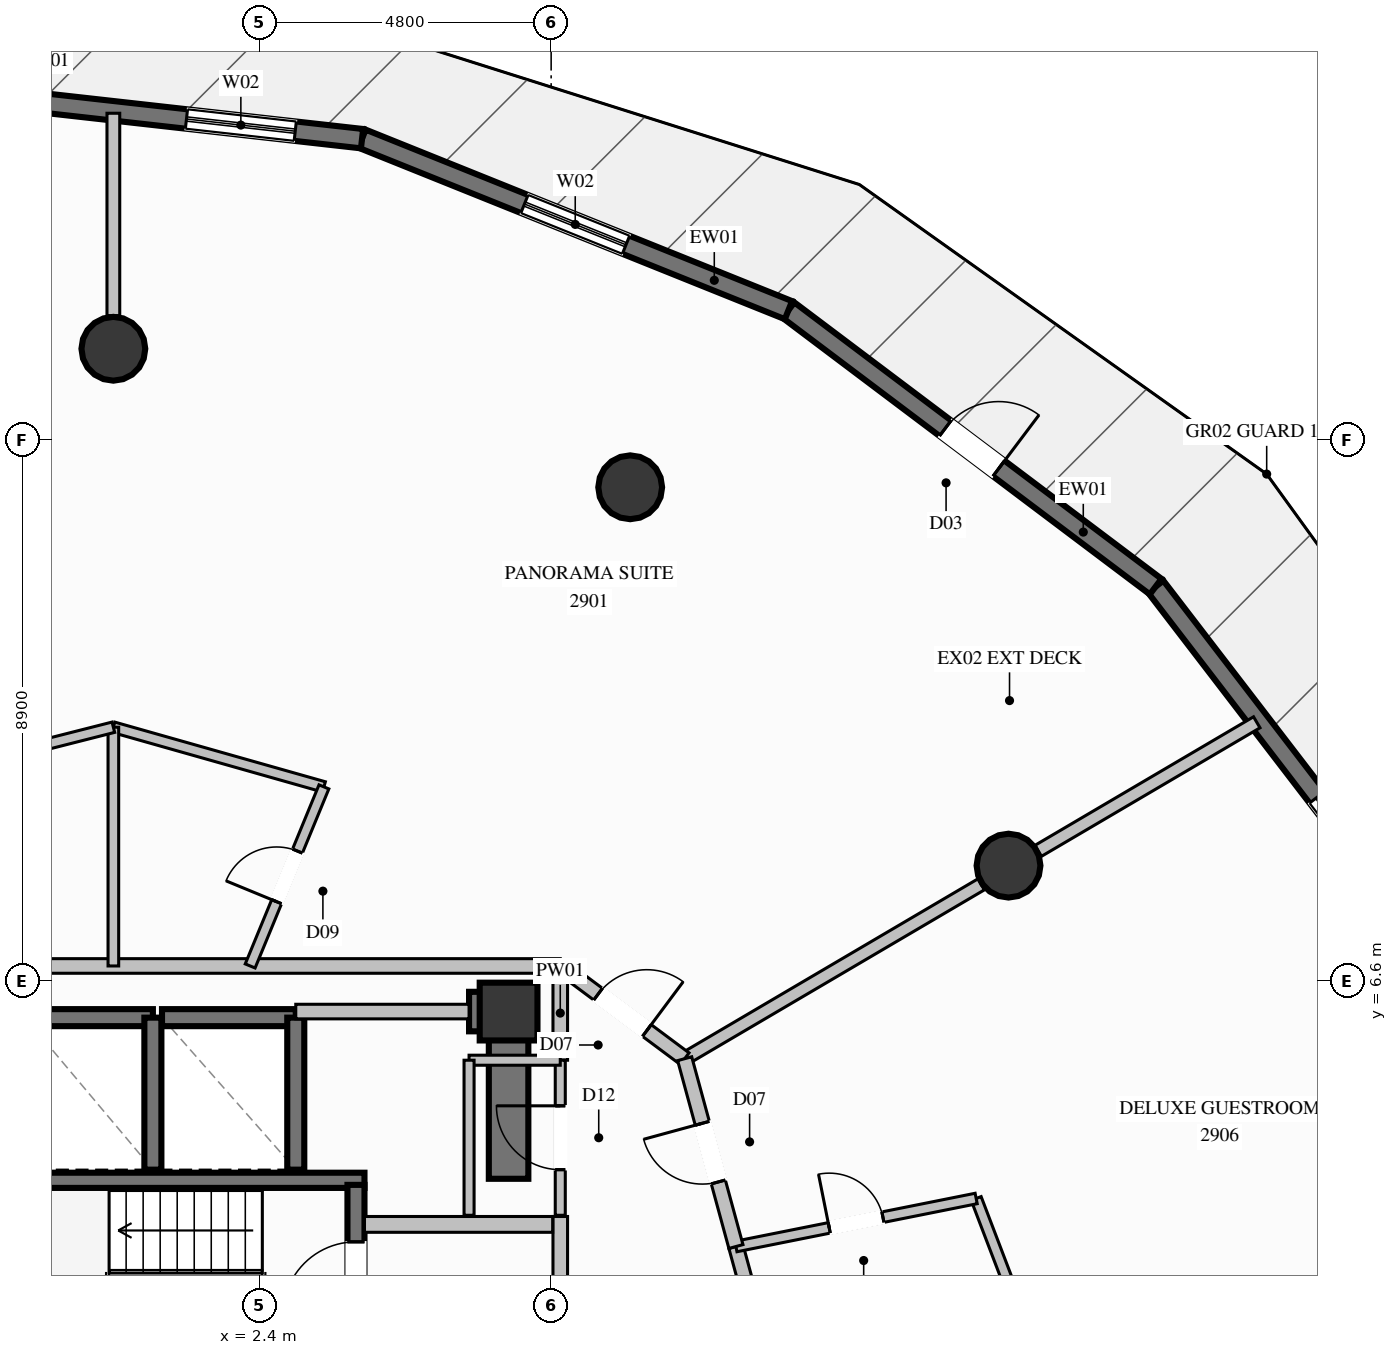
"""IFC4 building model, lengths in metres.
Left out: names, types, materials, properties, quantities, classifications, styles, units other than length and angle.
Written with IfcOpenShell. Run it as: python <this file> out.ifc"""

import sys

from ifc_helpers import new_model, si_unit, direction, frame, frame_2d, origin, origin_2d, place, context, subcontext, project, spatial, rectangle, circle, extrude, element, fill, save


model = new_model("IFC4")
c1 = context("Model", 3, precision=1e-05, world=origin(), true_north=direction((0.0, 1.0)))
c2 = subcontext(c1, "Body", "Model", "MODEL_VIEW")
j1 = project(units=[si_unit("LENGTHUNIT", "METRE"), si_unit("PLANEANGLEUNIT", "RADIAN")], contexts=[c1])
p1 = place(None, origin())
s1 = spatial("IfcSite", under=j1, at=p1, CompositionType="ELEMENT")
p2 = place(p1, origin())
s2 = spatial("IfcBuilding", under=s1, at=p2, CompositionType="ELEMENT")
p3 = place(p2, frame((0.0, 0.0, 109.8)))
s3 = spatial("IfcBuildingStorey", under=s2, at=p3, CompositionType="ELEMENT", Elevation=109.8)
p4 = place(p3, frame((6.5, 6.1, 0.0), z_axis=(0.0, 0.0, 1.0), x_axis=(1.0, 0.0, 0.0)))
e1 = element("IfcColumn", 1, at=p4, inside=s3, PredefinedType="COLUMN", context=c2, shape_type="SweptSolid", body=[
    extrude(rectangle(XDim=0.95, YDim=0.95, at=origin_2d()), origin(), (0.0, 0.0, 1.0), 3.6),
])
p5 = place(p3, frame((-4.13, 3.325, 0.0), z_axis=(0.0, 0.0, 1.0), x_axis=(1.0, 0.0, 0.0)))
e2 = element("IfcWall", 2, at=p5, inside=s3, PredefinedType="SOLIDWALL", context=c2, shape_type="SweptSolid", body=[
    extrude(rectangle(XDim=8.26, YDim=0.25, at=frame_2d((4.13, 0.0))), origin(), (0.0, 0.0, 1.0), 3.6),
])
p6 = place(p3, frame((5.85, 6.1, 0.0), z_axis=(0.0, 0.0, 1.0), x_axis=(1.0, 0.0, 0.0)))
e3 = element("IfcWall", 3, at=p6, inside=s3, PredefinedType="SHEAR", context=c2, shape_type="SweptSolid", body=[
    extrude(rectangle(XDim=0.325, YDim=0.65, at=frame_2d((0.163, 0.0))), origin(), (0.0, 0.0, 1.0), 3.6),
])
p7 = place(p3, frame((6.5, 3.35, 0.0), z_axis=(0.0, 0.0, 1.0), x_axis=(0.0, 1.0, 0.0)))
e4 = element("IfcWall", 4, at=p7, inside=s3, PredefinedType="SHEAR", context=c2, shape_type="SweptSolid", body=[
    extrude(rectangle(XDim=3.075, YDim=0.65, at=frame_2d((1.538, 0.0))), origin(), (0.0, 0.0, 1.0), 3.6),
])
for number, where, z_axis, x_axis in (
    (5, (14.722, 8.5, 0.0), (0.0, 0.0, 1.0), (1.0, 0.0, 0.0)),
    (6, (8.5, 14.722, 0.0), (0.0, 0.0, 1.0), (1.0, 0.0, 0.0)),
    (7, (0.0, 17.0, 0.0), (0.0, 0.0, 1.0), (1.0, 0.0, 0.0)),
):
    element("IfcColumn", number, at=place(p3, frame(where, z_axis=z_axis, x_axis=x_axis)), inside=s3, PredefinedType="COLUMN", context=c2, shape_type="SweptSolid", body=[
        extrude(circle(Radius=0.525, at=origin_2d()), origin(), (0.0, 0.0, 1.0), 3.6),
    ])
p8 = place(p3, frame((17.142, 13.089, 0.0), z_axis=(0.0, 0.0, 1.0), x_axis=(0.608831916989, -0.793299247986, 0.0)))
e8 = element("IfcWall", 8, at=p8, inside=s3, PredefinedType="SOLIDWALL", context=c2, shape_type="SweptSolid", body=[
    extrude(rectangle(XDim=7.347, YDim=0.32, at=frame_2d((3.673, 0.0))), origin(), (0.0, 0.0, 1.0), 3.35),
])
p9 = place(p8, frame((4.365, 0.0, 0.85)))
e9 = element("IfcOpeningElement", 9, at=p9, cuts=e8, PredefinedType="OPENING", context=c2, shape_type="SweptSolid", body=[
    extrude(rectangle(XDim=1.5, YDim=1.2, at=frame_2d((0.75, 0.6))), frame((0.0, 0.17, 0.0), z_axis=(0.0, -1.0, 0.0), x_axis=(1.0, 0.0, 0.0)), (0.0, 0.0, 1.0), 0.34),
])
p10 = place(p3, frame((11.103, 17.635, 0.0), z_axis=(0.0, 0.0, 1.0), x_axis=(0.798944530401, -0.601404720087, 0.0)))
e10 = element("IfcWall", 10, at=p10, inside=s3, PredefinedType="SOLIDWALL", context=c2, shape_type="SweptSolid", body=[
    extrude(rectangle(XDim=7.559, YDim=0.32, at=frame_2d((3.779, 0.0))), origin(), (0.0, 0.0, 1.0), 3.35),
])
p11 = place(p10, frame((3.229, 0.0, 0.0)))
e11 = element("IfcOpeningElement", 11, at=p11, cuts=e10, PredefinedType="OPENING", context=c2, shape_type="SweptSolid", body=[
    extrude(rectangle(XDim=1.1, YDim=2.2, at=frame_2d((0.55, 1.1))), frame((0.0, 0.17, 0.0), z_axis=(0.0, -1.0, 0.0), x_axis=(1.0, 0.0, 0.0)), (0.0, 0.0, 1.0), 0.34),
])
p12 = place(p3, frame((4.09, 20.455, 0.0), z_axis=(0.0, 0.0, 1.0), x_axis=(0.927795739468, -0.373088549577, 0.0)))
e12 = element("IfcWall", 12, at=p12, inside=s3, PredefinedType="SOLIDWALL", context=c2, shape_type="SweptSolid", body=[
    extrude(rectangle(XDim=7.559, YDim=0.32, at=frame_2d((3.779, 0.0))), origin(), (0.0, 0.0, 1.0), 3.35),
])
p13 = place(p12, frame((2.879, 0.0, 0.35)))
e13 = element("IfcOpeningElement", 13, at=p13, cuts=e12, PredefinedType="OPENING", context=c2, shape_type="SweptSolid", body=[
    extrude(rectangle(XDim=1.8, YDim=2.6, at=frame_2d((0.9, 1.3))), frame((0.0, 0.17, 0.0), z_axis=(0.0, -1.0, 0.0), x_axis=(1.0, 0.0, 0.0)), (0.0, 0.0, 1.0), 0.34),
])
p14 = place(p3, frame((-3.211, 21.273, 0.0), z_axis=(0.0, 0.0, 1.0), x_axis=(0.993784044115, -0.111325081016, 0.0)))
e14 = element("IfcWall", 14, at=p14, inside=s3, PredefinedType="SOLIDWALL", context=c2, shape_type="SweptSolid", body=[
    extrude(rectangle(XDim=7.347, YDim=0.32, at=frame_2d((3.673, 0.0))), origin(), (0.0, 0.0, 1.0), 3.35),
])
p15 = place(p14, frame((4.441, 0.0, 0.35)))
e15 = element("IfcOpeningElement", 15, at=p15, cuts=e14, PredefinedType="OPENING", context=c2, shape_type="SweptSolid", body=[
    extrude(rectangle(XDim=1.8, YDim=2.6, at=frame_2d((0.9, 1.3))), frame((0.0, 0.17, 0.0), z_axis=(0.0, -1.0, 0.0), x_axis=(1.0, 0.0, 0.0)), (0.0, 0.0, 1.0), 0.34),
])
p16 = place(p3, frame((0.65, 6.0, 0.0), z_axis=(0.0, 0.0, 1.0), x_axis=(-1.0, 0.0, 0.0)))
e16 = element("IfcWall", 16, at=p16, inside=s3, PredefinedType="SOLIDWALL", context=c2, shape_type="SweptSolid", body=[
    extrude(rectangle(XDim=2.1, YDim=0.28, at=frame_2d((1.05, 0.0))), origin(), (0.0, 0.0, 1.0), 3.35),
])
p17 = place(p3, frame((0.65, 3.5, 0.0), z_axis=(0.0, 0.0, 1.0), x_axis=(0.0, 1.0, 0.0)))
e17 = element("IfcWall", 17, at=p17, inside=s3, PredefinedType="SOLIDWALL", context=c2, shape_type="SweptSolid", body=[
    extrude(rectangle(XDim=2.5, YDim=0.28, at=frame_2d((1.25, 0.0))), origin(), (0.0, 0.0, 1.0), 3.35),
])
p18 = place(p3, frame((3.0, 6.0, 0.0), z_axis=(0.0, 0.0, 1.0), x_axis=(-1.0, 0.0, 0.0)))
e18 = element("IfcWall", 18, at=p18, inside=s3, PredefinedType="SOLIDWALL", context=c2, shape_type="SweptSolid", body=[
    extrude(rectangle(XDim=2.2, YDim=0.28, at=frame_2d((1.1, 0.0))), origin(), (0.0, 0.0, 1.0), 3.35),
])
p19 = place(p3, frame((3.0, 3.5, 0.0), z_axis=(0.0, 0.0, 1.0), x_axis=(0.0, 1.0, 0.0)))
e19 = element("IfcWall", 19, at=p19, inside=s3, PredefinedType="SOLIDWALL", context=c2, shape_type="SweptSolid", body=[
    extrude(rectangle(XDim=2.5, YDim=0.28, at=frame_2d((1.25, 0.0))), origin(), (0.0, 0.0, 1.0), 3.35),
])
p20 = place(p3, frame((3.99, -2.21, 0.0), z_axis=(0.0, 0.0, 1.0), x_axis=(0.0, 1.0, 0.0)))
e20 = element("IfcWall", 20, at=p20, inside=s3, PredefinedType="SOLIDWALL", context=c2, shape_type="SweptSolid", body=[
    extrude(rectangle(XDim=5.46, YDim=0.28, at=frame_2d((2.73, 0.0))), origin(), (0.0, 0.0, 1.0), 3.35),
])
p21 = place(p20, frame((3.323, 0.0, 0.0)))
e21 = element("IfcOpeningElement", 21, at=p21, cuts=e20, PredefinedType="OPENING", context=c2, shape_type="SweptSolid", body=[
    extrude(rectangle(XDim=1.2, YDim=2.2, at=frame_2d((0.6, 1.1))), frame((0.0, 0.15, 0.0), z_axis=(0.0, -1.0, 0.0), x_axis=(1.0, 0.0, 0.0)), (0.0, 0.0, 1.0), 0.3),
])
p22 = place(p3, frame((7.35, -2.34, 0.0), z_axis=(0.0, 0.0, 1.0), x_axis=(0.0, 1.0, 0.0)))
e22 = element("IfcWall", 22, at=p22, inside=s3, PredefinedType="PARTITIONING", context=c2, shape_type="SweptSolid", body=[
    extrude(rectangle(XDim=5.07, YDim=0.24, at=frame_2d((2.535, 0.0))), origin(), (0.0, 0.0, 1.0), 2.435),
])
p23 = place(p22, frame((2.548, 0.0, 0.0)))
e23 = element("IfcOpeningElement", 23, at=p23, cuts=e22, PredefinedType="OPENING", context=c2, shape_type="SweptSolid", body=[
    extrude(rectangle(XDim=1.15, YDim=2.2, at=frame_2d((0.575, 1.1))), frame((0.0, 0.13, 0.0), z_axis=(0.0, -1.0, 0.0), x_axis=(1.0, 0.0, 0.0)), (0.0, 0.0, 1.0), 0.26),
])
p24 = place(p3, frame((4.13, 2.6, 0.0), z_axis=(0.0, 0.0, 1.0), x_axis=(1.0, 0.0, 0.0)))
e24 = element("IfcWall", 24, at=p24, inside=s3, PredefinedType="PARTITIONING", context=c2, shape_type="SweptSolid", body=[
    extrude(rectangle(XDim=3.095, YDim=0.26, at=frame_2d((1.548, 0.0))), origin(), (0.0, 0.0, 1.0), 3.35),
])
p25 = place(p3, frame((-7.35, 6.85, 0.0), z_axis=(0.0, 0.0, 1.0), x_axis=(1.0, 0.0, 0.0)))
e25 = element("IfcWall", 25, at=p25, inside=s3, PredefinedType="PARTITIONING", context=c2, shape_type="SweptSolid", body=[
    extrude(rectangle(XDim=14.7, YDim=0.24, at=frame_2d((7.35, 0.0))), origin(), (0.0, 0.0, 1.0), 2.435),
])
p26 = place(p3, frame((7.35, 5.3, 0.0), z_axis=(0.0, 0.0, 1.0), x_axis=(0.0, 1.0, 0.0)))
e26 = element("IfcWall", 26, at=p26, inside=s3, PredefinedType="PARTITIONING", context=c2, shape_type="SweptSolid", body=[
    extrude(rectangle(XDim=1.55, YDim=0.24, at=frame_2d((0.775, 0.0))), origin(), (0.0, 0.0, 1.0), 2.435),
])
p27 = place(p3, frame((3.0, 6.1, 0.0), z_axis=(0.0, 0.0, 1.0), x_axis=(1.0, 0.0, 0.0)))
e27 = element("IfcWall", 27, at=p27, inside=s3, PredefinedType="PARTITIONING", context=c2, shape_type="SweptSolid", body=[
    extrude(rectangle(XDim=2.85, YDim=0.24, at=frame_2d((1.425, 0.0))), origin(), (0.0, 0.0, 1.0), 2.421),
])
p28 = place(p3, frame((7.35, 2.75, 0.0), z_axis=(0.0, 0.0, 1.0), x_axis=(0.0, 1.0, 0.0)))
e28 = element("IfcWall", 28, at=p28, inside=s3, PredefinedType="PARTITIONING", context=c2, shape_type="SweptSolid", body=[
    extrude(rectangle(XDim=2.55, YDim=0.165, at=frame_2d((1.275, 0.0))), origin(), (0.0, 0.0, 1.0), 3.35),
])
p29 = place(p28, frame((0.75, 0.0, 0.0)))
e29 = element("IfcOpeningElement", 29, at=p29, cuts=e28, PredefinedType="OPENING", context=c2, shape_type="SweptSolid", body=[
    extrude(rectangle(XDim=1.05, YDim=2.15, at=frame_2d((0.525, 1.075))), frame((0.0, 0.093, 0.0), z_axis=(0.0, -1.0, 0.0), x_axis=(1.0, 0.0, 0.0)), (0.0, 0.0, 1.0), 0.185),
])
p30 = place(p3, frame((7.35, 5.3, 0.0), z_axis=(0.0, 0.0, 1.0), x_axis=(-1.0, 0.0, 0.0)))
e30 = element("IfcWall", 30, at=p30, inside=s3, PredefinedType="PARTITIONING", context=c2, shape_type="SweptSolid", body=[
    extrude(rectangle(XDim=1.5, YDim=0.165, at=frame_2d((0.75, 0.0))), origin(), (0.0, 0.0, 1.0), 2.421),
])
p31 = place(p3, frame((5.85, 5.3, 0.0), z_axis=(0.0, 0.0, 1.0), x_axis=(0.0, -1.0, 0.0)))
e31 = element("IfcWall", 31, at=p31, inside=s3, PredefinedType="PARTITIONING", context=c2, shape_type="SweptSolid", body=[
    extrude(rectangle(XDim=2.55, YDim=0.165, at=frame_2d((1.275, 0.0))), origin(), (0.0, 0.0, 1.0), 2.435),
])
p32 = place(p3, frame((9.396, 5.325, 0.0), z_axis=(0.0, 0.0, 1.0), x_axis=(0.862032950085, 0.506852239778, 0.0)))
e32 = element("IfcWall", 32, at=p32, inside=s3, PredefinedType="PARTITIONING", context=c2, shape_type="SweptSolid", body=[
    extrude(rectangle(XDim=5.656, YDim=0.21, at=frame_2d((2.828, 0.0))), origin(), (0.0, 0.0, 1.0), 2.791),
])
p33 = place(p3, frame((15.21, 8.743, 0.0), z_axis=(0.0, 0.0, 1.0), x_axis=(0.862004936616, 0.506899880894, 0.0)))
e33 = element("IfcWall", 33, at=p33, inside=s3, PredefinedType="PARTITIONING", context=c2, shape_type="SweptSolid", body=[
    extrude(rectangle(XDim=4.17, YDim=0.21, at=frame_2d((2.085, 0.0))), origin(), (0.0, 0.0, 1.0), 3.35),
])
p34 = place(p3, frame((0.0, 10.776, 0.0), z_axis=(0.0, 0.0, 1.0), x_axis=(0.962140957865, -0.272552338459, 0.0)))
e34 = element("IfcWall", 34, at=p34, inside=s3, PredefinedType="PLUMBINGWALL", context=c2, shape_type="SweptSolid", body=[
    extrude(rectangle(XDim=3.599, YDim=0.175, at=frame_2d((1.8, 0.0))), origin(), (0.0, 0.0, 1.0), 2.985),
])
p35 = place(p3, frame((0.0, 10.776, 0.0), z_axis=(0.0, 0.0, 1.0), x_axis=(0.0, -1.0, 0.0)))
e35 = element("IfcWall", 35, at=p35, inside=s3, PredefinedType="PLUMBINGWALL", context=c2, shape_type="SweptSolid", body=[
    extrude(rectangle(XDim=3.926, YDim=0.175, at=frame_2d((1.963, 0.0))), origin(), (0.0, 0.0, 1.0), 3.35),
])
p36 = place(p3, frame((2.25, 6.85, 0.0), z_axis=(0.0, 0.0, 1.0), x_axis=(0.380834625893, 0.924643167779, 0.0)))
e36 = element("IfcWall", 36, at=p36, inside=s3, PredefinedType="PLUMBINGWALL", context=c2, shape_type="SweptSolid", body=[
    extrude(rectangle(XDim=3.185, YDim=0.175, at=frame_2d((1.592, 0.0))), origin(), (0.0, 0.0, 1.0), 3.35),
])
p37 = place(p36, frame((1.143, 0.0, 0.0)))
e37 = element("IfcOpeningElement", 37, at=p37, cuts=e36, PredefinedType="OPENING", context=c2, shape_type="SweptSolid", body=[
    extrude(rectangle(XDim=0.9, YDim=2.1, at=frame_2d((0.45, 1.05))), frame((0.0, 0.098, 0.0), z_axis=(0.0, -1.0, 0.0), x_axis=(1.0, 0.0, 0.0)), (0.0, 0.0, 1.0), 0.195),
])
p38 = place(p3, frame((0.0, 17.545, 0.0), z_axis=(0.0, 0.0, 1.0), x_axis=(0.0, 1.0, 0.0)))
e38 = element("IfcWall", 38, at=p38, inside=s3, PredefinedType="PARTITIONING", context=c2, shape_type="SweptSolid", body=[
    extrude(rectangle(XDim=3.328, YDim=0.21, at=frame_2d((1.664, 0.0))), origin(), (0.0, 0.0, 1.0), 3.35),
])
p39 = place(p3, frame((7.35, 6.85, 0.0), z_axis=(0.0, 0.0, 1.0), x_axis=(0.8017416961, -0.597670689205, 0.0)))
e39 = element("IfcWall", 39, at=p39, inside=s3, PredefinedType="PARTITIONING", context=c2, shape_type="SweptSolid", body=[
    extrude(rectangle(XDim=2.552, YDim=0.24, at=frame_2d((1.276, 0.0))), origin(), (0.0, 0.0, 1.0), 3.35),
])
p40 = place(p39, frame((0.776, 0.0, 0.0)))
e40 = element("IfcOpeningElement", 40, at=p40, cuts=e39, PredefinedType="OPENING", context=c2, shape_type="SweptSolid", body=[
    extrude(rectangle(XDim=1.0, YDim=2.2, at=frame_2d((0.5, 1.1))), frame((0.0, 0.13, 0.0), z_axis=(0.0, -1.0, 0.0), x_axis=(1.0, 0.0, 0.0)), (0.0, 0.0, 1.0), 0.26),
])
p41 = place(p3, frame((-3.584, 9.865, 0.0), z_axis=(0.0, 0.0, 1.0), x_axis=(0.969187500781, 0.246324152957, 0.0)))
e41 = element("IfcWall", 41, at=p41, inside=s3, PredefinedType="PLUMBINGWALL", context=c2, shape_type="SweptSolid", body=[
    extrude(rectangle(XDim=3.698, YDim=0.175, at=frame_2d((1.849, 0.0))), origin(), (0.0, 0.0, 1.0), 2.985),
])
p42 = place(p3, frame((10.85, 0.0, 0.0), z_axis=(0.0, 0.0, 1.0), x_axis=(-0.263616426241, 0.964627586074, 0.0)))
e42 = element("IfcWall", 42, at=p42, inside=s3, PredefinedType="PARTITIONING", context=c2, shape_type="SweptSolid", body=[
    extrude(rectangle(XDim=2.318, YDim=0.24, at=frame_2d((1.159, 0.0))), origin(), (0.0, 0.0, 1.0), 2.985),
])
p43 = place(p3, frame((15.345, 0.0, 0.0), z_axis=(0.0, 0.0, 1.0), x_axis=(-0.35661902988, 0.934249895653, 0.0)))
e43 = element("IfcWall", 43, at=p43, inside=s3, PredefinedType="PLUMBINGWALL", context=c2, shape_type="SweptSolid", body=[
    extrude(rectangle(XDim=3.239, YDim=0.175, at=frame_2d((1.619, 0.0))), origin(), (0.0, 0.0, 1.0), 3.35),
])
p44 = place(p3, frame((10.239, 2.236, 0.0), z_axis=(0.0, 0.0, 1.0), x_axis=(0.980599315693, 0.196022912085, 0.0)))
e44 = element("IfcWall", 44, at=p44, inside=s3, PredefinedType="PLUMBINGWALL", context=c2, shape_type="SweptSolid", body=[
    extrude(rectangle(XDim=4.029, YDim=0.175, at=frame_2d((2.015, 0.0))), origin(), (0.0, 0.0, 1.0), 3.35),
])
p45 = place(p44, frame((1.565, 0.0, 0.0)))
e45 = element("IfcOpeningElement", 45, at=p45, cuts=e44, PredefinedType="OPENING", context=c2, shape_type="SweptSolid", body=[
    extrude(rectangle(XDim=0.9, YDim=2.1, at=frame_2d((0.45, 1.05))), frame((0.0, 0.098, 0.0), z_axis=(0.0, -1.0, 0.0), x_axis=(1.0, 0.0, 0.0)), (0.0, 0.0, 1.0), 0.195),
])
p46 = place(p3, frame((10.239, 2.236, 0.0), z_axis=(0.0, 0.0, 1.0), x_axis=(-0.26329160366, 0.964716295831, 0.0)))
e46 = element("IfcWall", 46, at=p46, inside=s3, PredefinedType="PARTITIONING", context=c2, shape_type="SweptSolid", body=[
    extrude(rectangle(XDim=3.202, YDim=0.24, at=frame_2d((1.601, 0.0))), origin(), (0.0, 0.0, 1.0), 3.35),
])
p47 = place(p46, frame((1.101, 0.0, 0.0)))
e47 = element("IfcOpeningElement", 47, at=p47, cuts=e46, PredefinedType="OPENING", context=c2, shape_type="SweptSolid", body=[
    extrude(rectangle(XDim=1.0, YDim=2.2, at=frame_2d((0.5, 1.1))), frame((0.0, 0.13, 0.0), z_axis=(0.0, -1.0, 0.0), x_axis=(1.0, 0.0, 0.0)), (0.0, 0.0, 1.0), 0.26),
])
p48 = place(p9, origin())
e48 = element("IfcWindow", 48, at=p48, inside=s3, PartitioningType="SINGLE_PANEL", PredefinedType="WINDOW", context=c2, shape_type="SweptSolid", body=[
    extrude(rectangle(XDim=1.5, YDim=1.2, at=frame_2d((0.75, 0.6))), frame((0.0, 0.03, 0.0), z_axis=(0.0, -1.0, 0.0), x_axis=(1.0, 0.0, 0.0)), (0.0, 0.0, 1.0), 0.06),
])
fill(e9, e48)
p49 = place(p11, origin())
e49 = element("IfcDoor", 49, at=p49, inside=s3, OperationType="SINGLE_SWING_RIGHT", PredefinedType="DOOR", context=c2, shape_type="SweptSolid", body=[
    extrude(rectangle(XDim=1.1, YDim=2.2, at=frame_2d((0.55, 1.1))), frame((0.0, 0.025, 0.0), z_axis=(0.0, -1.0, 0.0), x_axis=(1.0, 0.0, 0.0)), (0.0, 0.0, 1.0), 0.05),
])
fill(e11, e49)
p50 = place(p13, origin())
e50 = element("IfcWindow", 50, at=p50, inside=s3, PartitioningType="SINGLE_PANEL", PredefinedType="WINDOW", context=c2, shape_type="SweptSolid", body=[
    extrude(rectangle(XDim=1.8, YDim=2.6, at=frame_2d((0.9, 1.3))), frame((0.0, 0.03, 0.0), z_axis=(0.0, -1.0, 0.0), x_axis=(1.0, 0.0, 0.0)), (0.0, 0.0, 1.0), 0.06),
])
fill(e13, e50)
p51 = place(p15, origin())
e51 = element("IfcWindow", 51, at=p51, inside=s3, PartitioningType="SINGLE_PANEL", PredefinedType="WINDOW", context=c2, shape_type="SweptSolid", body=[
    extrude(rectangle(XDim=1.8, YDim=2.6, at=frame_2d((0.9, 1.3))), frame((0.0, 0.03, 0.0), z_axis=(0.0, -1.0, 0.0), x_axis=(1.0, 0.0, 0.0)), (0.0, 0.0, 1.0), 0.06),
])
fill(e15, e51)
p52 = place(p21, origin())
e52 = element("IfcDoor", 52, at=p52, inside=s3, OperationType="SINGLE_SWING_LEFT", PredefinedType="DOOR", context=c2, shape_type="SweptSolid", body=[
    extrude(rectangle(XDim=1.2, YDim=2.2, at=frame_2d((0.6, 1.1))), frame((0.0, 0.025, 0.0), z_axis=(0.0, -1.0, 0.0), x_axis=(1.0, 0.0, 0.0)), (0.0, 0.0, 1.0), 0.05),
])
fill(e21, e52)
p53 = place(p29, origin())
e53 = element("IfcDoor", 53, at=p53, inside=s3, OperationType="SINGLE_SWING_RIGHT", PredefinedType="DOOR", context=c2, shape_type="SweptSolid", body=[
    extrude(rectangle(XDim=1.05, YDim=2.15, at=frame_2d((0.525, 1.075))), frame((0.0, 0.025, 0.0), z_axis=(0.0, -1.0, 0.0), x_axis=(1.0, 0.0, 0.0)), (0.0, 0.0, 1.0), 0.05),
])
fill(e29, e53)
p54 = place(p37, origin())
e54 = element("IfcDoor", 54, at=p54, inside=s3, OperationType="SINGLE_SWING_LEFT", PredefinedType="DOOR", context=c2, shape_type="SweptSolid", body=[
    extrude(rectangle(XDim=0.9, YDim=2.1, at=frame_2d((0.45, 1.05))), frame((0.0, 0.025, 0.0), z_axis=(0.0, -1.0, 0.0), x_axis=(1.0, 0.0, 0.0)), (0.0, 0.0, 1.0), 0.05),
])
fill(e37, e54)
p55 = place(p40, origin())
e55 = element("IfcDoor", 55, at=p55, inside=s3, OperationType="SINGLE_SWING_RIGHT", PredefinedType="DOOR", context=c2, shape_type="SweptSolid", body=[
    extrude(rectangle(XDim=1.0, YDim=2.2, at=frame_2d((0.5, 1.1))), frame((0.0, 0.025, 0.0), z_axis=(0.0, -1.0, 0.0), x_axis=(1.0, 0.0, 0.0)), (0.0, 0.0, 1.0), 0.05),
])
fill(e40, e55)
p56 = place(p45, origin())
e56 = element("IfcDoor", 56, at=p56, inside=s3, OperationType="SINGLE_SWING_LEFT", PredefinedType="DOOR", context=c2, shape_type="SweptSolid", body=[
    extrude(rectangle(XDim=0.9, YDim=2.1, at=frame_2d((0.45, 1.05))), frame((0.0, 0.025, 0.0), z_axis=(0.0, -1.0, 0.0), x_axis=(1.0, 0.0, 0.0)), (0.0, 0.0, 1.0), 0.05),
])
fill(e45, e56)
p57 = place(p47, origin())
e57 = element("IfcDoor", 57, at=p57, inside=s3, OperationType="SINGLE_SWING_RIGHT", PredefinedType="DOOR", context=c2, shape_type="SweptSolid", body=[
    extrude(rectangle(XDim=1.0, YDim=2.2, at=frame_2d((0.5, 1.1))), frame((0.0, 0.025, 0.0), z_axis=(0.0, -1.0, 0.0), x_axis=(1.0, 0.0, 0.0)), (0.0, 0.0, 1.0), 0.05),
])
fill(e47, e57)
save(model, sys.argv[1])
